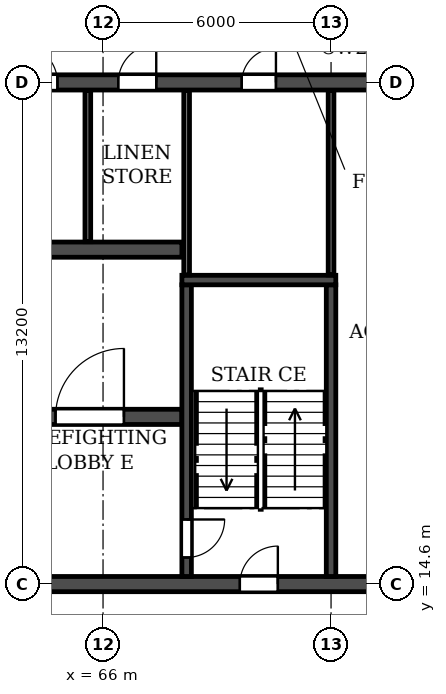
"""IFC4 building model, lengths in metres.
Left out: names, types, materials, properties, quantities, classifications, styles, units other than length and angle.
Written with IfcOpenShell. Run it as: python <this file> out.ifc"""

import sys

from ifc_helpers import new_model, si_unit, direction, frame, frame_2d, origin, place, context, subcontext, project, spatial, rectangle, extrude, element, fill, save


model = new_model("IFC4")
c1 = context("Model", 3, precision=1e-05, world=origin(), true_north=direction((0.0, 1.0)))
c2 = subcontext(c1, "Body", "Model", "MODEL_VIEW")
j1 = project(units=[si_unit("LENGTHUNIT", "METRE"), si_unit("PLANEANGLEUNIT", "RADIAN")], contexts=[c1])
p1 = place(None, origin())
s1 = spatial("IfcSite", under=j1, at=p1, CompositionType="ELEMENT")
p2 = place(p1, origin())
s2 = spatial("IfcBuilding", under=s1, at=p2, CompositionType="ELEMENT")
p3 = place(p2, frame((0.0, 0.0, 175.2)))
s3 = spatial("IfcBuildingStorey", under=s2, at=p3, CompositionType="ELEMENT", Elevation=175.2)
p4 = place(p3, frame((18.2, 14.6, 0.0), z_axis=(0.0, 0.0, 1.0), x_axis=(1.0, 0.0, 0.0)))
e1 = element("IfcWall", 1, at=p4, inside=s3, PredefinedType="SOLIDWALL", context=c2, shape_type="SweptSolid", body=[
    extrude(rectangle(XDim=65.6, YDim=0.4, at=frame_2d((32.8, 0.0))), origin(), (0.0, 0.0, 1.0), 3.08),
])
p5 = place(p4, frame((0.7, 0.0, 0.0)))
e2 = element("IfcOpeningElement", 2, at=p5, cuts=e1, PredefinedType="OPENING", context=c2, shape_type="SweptSolid", body=[
    extrude(rectangle(XDim=1.0, YDim=2.1, at=frame_2d((0.5, 1.05))), frame((0.0, 0.21, 0.0), z_axis=(0.0, -1.0, 0.0), x_axis=(1.0, 0.0, 0.0)), (0.0, 0.0, 1.0), 0.42),
])
p6 = place(p4, frame((8.6, 0.0, 0.0)))
e3 = element("IfcOpeningElement", 3, at=p6, cuts=e1, PredefinedType="OPENING", context=c2, shape_type="SweptSolid", body=[
    extrude(rectangle(XDim=1.0, YDim=2.1, at=frame_2d((0.5, 1.05))), frame((0.0, 0.21, 0.0), z_axis=(0.0, -1.0, 0.0), x_axis=(1.0, 0.0, 0.0)), (0.0, 0.0, 1.0), 0.42),
])
p7 = place(p4, frame((13.2, 0.0, 0.0)))
e4 = element("IfcOpeningElement", 4, at=p7, cuts=e1, PredefinedType="OPENING", context=c2, shape_type="SweptSolid", body=[
    extrude(rectangle(XDim=1.0, YDim=2.1, at=frame_2d((0.5, 1.05))), frame((0.0, 0.21, 0.0), z_axis=(0.0, -1.0, 0.0), x_axis=(1.0, 0.0, 0.0)), (0.0, 0.0, 1.0), 0.42),
])
p8 = place(p4, frame((25.8, 0.0, 0.0)))
e5 = element("IfcOpeningElement", 5, at=p8, cuts=e1, PredefinedType="OPENING", context=c2, shape_type="SweptSolid", body=[
    extrude(rectangle(XDim=1.0, YDim=2.1, at=frame_2d((0.5, 1.05))), frame((0.0, 0.21, 0.0), z_axis=(0.0, -1.0, 0.0), x_axis=(1.0, 0.0, 0.0)), (0.0, 0.0, 1.0), 0.42),
])
p9 = place(p4, frame((29.7, 0.0, 0.0)))
e6 = element("IfcOpeningElement", 6, at=p9, cuts=e1, PredefinedType="OPENING", context=c2, shape_type="SweptSolid", body=[
    extrude(rectangle(XDim=1.0, YDim=2.1, at=frame_2d((0.5, 1.05))), frame((0.0, 0.21, 0.0), z_axis=(0.0, -1.0, 0.0), x_axis=(1.0, 0.0, 0.0)), (0.0, 0.0, 1.0), 0.42),
])
p10 = place(p4, frame((32.3, 0.0, 0.0)))
e7 = element("IfcOpeningElement", 7, at=p10, cuts=e1, PredefinedType="OPENING", context=c2, shape_type="SweptSolid", body=[
    extrude(rectangle(XDim=1.0, YDim=2.1, at=frame_2d((0.5, 1.05))), frame((0.0, 0.21, 0.0), z_axis=(0.0, -1.0, 0.0), x_axis=(1.0, 0.0, 0.0)), (0.0, 0.0, 1.0), 0.42),
])
p11 = place(p4, frame((37.5, 0.0, 0.0)))
e8 = element("IfcOpeningElement", 8, at=p11, cuts=e1, PredefinedType="OPENING", context=c2, shape_type="SweptSolid", body=[
    extrude(rectangle(XDim=1.0, YDim=2.1, at=frame_2d((0.5, 1.05))), frame((0.0, 0.21, 0.0), z_axis=(0.0, -1.0, 0.0), x_axis=(1.0, 0.0, 0.0)), (0.0, 0.0, 1.0), 0.42),
])
p12 = place(p4, frame((51.4, 0.0, 0.0)))
e9 = element("IfcOpeningElement", 9, at=p12, cuts=e1, PredefinedType="OPENING", context=c2, shape_type="SweptSolid", body=[
    extrude(rectangle(XDim=1.0, YDim=2.1, at=frame_2d((0.5, 1.05))), frame((0.0, 0.21, 0.0), z_axis=(0.0, -1.0, 0.0), x_axis=(1.0, 0.0, 0.0)), (0.0, 0.0, 1.0), 0.42),
])
p13 = place(p4, frame((56.0, 0.0, 0.0)))
e10 = element("IfcOpeningElement", 10, at=p13, cuts=e1, PredefinedType="OPENING", context=c2, shape_type="SweptSolid", body=[
    extrude(rectangle(XDim=1.0, YDim=2.1, at=frame_2d((0.5, 1.05))), frame((0.0, 0.21, 0.0), z_axis=(0.0, -1.0, 0.0), x_axis=(1.0, 0.0, 0.0)), (0.0, 0.0, 1.0), 0.42),
])
p14 = place(p4, frame((63.9, 0.0, 0.0)))
e11 = element("IfcOpeningElement", 11, at=p14, cuts=e1, PredefinedType="OPENING", context=c2, shape_type="SweptSolid", body=[
    extrude(rectangle(XDim=1.0, YDim=2.1, at=frame_2d((0.5, 1.05))), frame((0.0, 0.21, 0.0), z_axis=(0.0, -1.0, 0.0), x_axis=(1.0, 0.0, 0.0)), (0.0, 0.0, 1.0), 0.42),
])
p15 = place(p3, frame((18.2, 27.8, 0.0), z_axis=(0.0, 0.0, 1.0), x_axis=(1.0, 0.0, 0.0)))
e12 = element("IfcWall", 12, at=p15, inside=s3, PredefinedType="SOLIDWALL", context=c2, shape_type="SweptSolid", body=[
    extrude(rectangle(XDim=65.6, YDim=0.4, at=frame_2d((32.8, 0.0))), origin(), (0.0, 0.0, 1.0), 3.08),
])
p16 = place(p15, frame((0.7, 0.0, 0.0)))
e13 = element("IfcOpeningElement", 13, at=p16, cuts=e12, PredefinedType="OPENING", context=c2, shape_type="SweptSolid", body=[
    extrude(rectangle(XDim=1.0, YDim=2.1, at=frame_2d((0.5, 1.05))), frame((0.0, 0.21, 0.0), z_axis=(0.0, -1.0, 0.0), x_axis=(1.0, 0.0, 0.0)), (0.0, 0.0, 1.0), 0.42),
])
p17 = place(p15, frame((4.05, 0.0, 0.0)))
e14 = element("IfcOpeningElement", 14, at=p17, cuts=e12, PredefinedType="OPENING", context=c2, shape_type="SweptSolid", body=[
    extrude(rectangle(XDim=0.9, YDim=2.1, at=frame_2d((0.45, 1.05))), frame((0.0, 0.21, 0.0), z_axis=(0.0, -1.0, 0.0), x_axis=(1.0, 0.0, 0.0)), (0.0, 0.0, 1.0), 0.42),
])
p18 = place(p15, frame((13.25, 0.0, 0.0)))
e15 = element("IfcOpeningElement", 15, at=p18, cuts=e12, PredefinedType="OPENING", context=c2, shape_type="SweptSolid", body=[
    extrude(rectangle(XDim=0.9, YDim=2.1, at=frame_2d((0.45, 1.05))), frame((0.0, 0.21, 0.0), z_axis=(0.0, -1.0, 0.0), x_axis=(1.0, 0.0, 0.0)), (0.0, 0.0, 1.0), 0.42),
])
p19 = place(p15, frame((17.7, 0.0, 0.0)))
e16 = element("IfcOpeningElement", 16, at=p19, cuts=e12, PredefinedType="OPENING", context=c2, shape_type="SweptSolid", body=[
    extrude(rectangle(XDim=1.0, YDim=2.1, at=frame_2d((0.5, 1.05))), frame((0.0, 0.21, 0.0), z_axis=(0.0, -1.0, 0.0), x_axis=(1.0, 0.0, 0.0)), (0.0, 0.0, 1.0), 0.42),
])
p20 = place(p15, frame((22.9, 0.0, 0.0)))
e17 = element("IfcOpeningElement", 17, at=p20, cuts=e12, PredefinedType="OPENING", context=c2, shape_type="SweptSolid", body=[
    extrude(rectangle(XDim=1.0, YDim=2.1, at=frame_2d((0.5, 1.05))), frame((0.0, 0.21, 0.0), z_axis=(0.0, -1.0, 0.0), x_axis=(1.0, 0.0, 0.0)), (0.0, 0.0, 1.0), 0.42),
])
p21 = place(p15, frame((29.4, 0.0, 0.0)))
e18 = element("IfcOpeningElement", 18, at=p21, cuts=e12, PredefinedType="OPENING", context=c2, shape_type="SweptSolid", body=[
    extrude(rectangle(XDim=1.0, YDim=2.1, at=frame_2d((0.5, 1.05))), frame((0.0, 0.21, 0.0), z_axis=(0.0, -1.0, 0.0), x_axis=(1.0, 0.0, 0.0)), (0.0, 0.0, 1.0), 0.42),
])
p22 = place(p15, frame((32.3, 0.0, 0.0)))
e19 = element("IfcOpeningElement", 19, at=p22, cuts=e12, PredefinedType="OPENING", context=c2, shape_type="SweptSolid", body=[
    extrude(rectangle(XDim=1.0, YDim=2.1, at=frame_2d((0.5, 1.05))), frame((0.0, 0.21, 0.0), z_axis=(0.0, -1.0, 0.0), x_axis=(1.0, 0.0, 0.0)), (0.0, 0.0, 1.0), 0.42),
])
p23 = place(p15, frame((36.5, 0.0, 0.0)))
e20 = element("IfcOpeningElement", 20, at=p23, cuts=e12, PredefinedType="OPENING", context=c2, shape_type="SweptSolid", body=[
    extrude(rectangle(XDim=1.0, YDim=2.1, at=frame_2d((0.5, 1.05))), frame((0.0, 0.21, 0.0), z_axis=(0.0, -1.0, 0.0), x_axis=(1.0, 0.0, 0.0)), (0.0, 0.0, 1.0), 0.42),
])
p24 = place(p15, frame((41.7, 0.0, 0.0)))
e21 = element("IfcOpeningElement", 21, at=p24, cuts=e12, PredefinedType="OPENING", context=c2, shape_type="SweptSolid", body=[
    extrude(rectangle(XDim=1.0, YDim=2.1, at=frame_2d((0.5, 1.05))), frame((0.0, 0.21, 0.0), z_axis=(0.0, -1.0, 0.0), x_axis=(1.0, 0.0, 0.0)), (0.0, 0.0, 1.0), 0.42),
])
p25 = place(p15, frame((45.6, 0.0, 0.0)))
e22 = element("IfcOpeningElement", 22, at=p25, cuts=e12, PredefinedType="OPENING", context=c2, shape_type="SweptSolid", body=[
    extrude(rectangle(XDim=1.0, YDim=2.1, at=frame_2d((0.5, 1.05))), frame((0.0, 0.21, 0.0), z_axis=(0.0, -1.0, 0.0), x_axis=(1.0, 0.0, 0.0)), (0.0, 0.0, 1.0), 0.42),
])
p26 = place(p15, frame((48.2, 0.0, 0.0)))
e23 = element("IfcOpeningElement", 23, at=p26, cuts=e12, PredefinedType="OPENING", context=c2, shape_type="SweptSolid", body=[
    extrude(rectangle(XDim=1.0, YDim=2.1, at=frame_2d((0.5, 1.05))), frame((0.0, 0.21, 0.0), z_axis=(0.0, -1.0, 0.0), x_axis=(1.0, 0.0, 0.0)), (0.0, 0.0, 1.0), 0.42),
])
p27 = place(p15, frame((51.45, 0.0, 0.0)))
e24 = element("IfcOpeningElement", 24, at=p27, cuts=e12, PredefinedType="OPENING", context=c2, shape_type="SweptSolid", body=[
    extrude(rectangle(XDim=0.9, YDim=2.1, at=frame_2d((0.45, 1.05))), frame((0.0, 0.21, 0.0), z_axis=(0.0, -1.0, 0.0), x_axis=(1.0, 0.0, 0.0)), (0.0, 0.0, 1.0), 0.42),
])
p28 = place(p15, frame((60.65, 0.0, 0.0)))
e25 = element("IfcOpeningElement", 25, at=p28, cuts=e12, PredefinedType="OPENING", context=c2, shape_type="SweptSolid", body=[
    extrude(rectangle(XDim=0.9, YDim=2.1, at=frame_2d((0.45, 1.05))), frame((0.0, 0.21, 0.0), z_axis=(0.0, -1.0, 0.0), x_axis=(1.0, 0.0, 0.0)), (0.0, 0.0, 1.0), 0.42),
])
p29 = place(p15, frame((63.9, 0.0, 0.0)))
e26 = element("IfcOpeningElement", 26, at=p29, cuts=e12, PredefinedType="OPENING", context=c2, shape_type="SweptSolid", body=[
    extrude(rectangle(XDim=1.0, YDim=2.1, at=frame_2d((0.5, 1.05))), frame((0.0, 0.21, 0.0), z_axis=(0.0, -1.0, 0.0), x_axis=(1.0, 0.0, 0.0)), (0.0, 0.0, 1.0), 0.42),
])
p30 = place(p3, frame((33.925, 19.0, 0.0), z_axis=(0.0, 0.0, 1.0), x_axis=(1.0, 0.0, 0.0)))
e27 = element("IfcWall", 27, at=p30, inside=s3, PredefinedType="SOLIDWALL", context=c2, shape_type="SweptSolid", body=[
    extrude(rectangle(XDim=34.15, YDim=0.4, at=frame_2d((17.075, 0.0))), origin(), (0.0, 0.0, 1.0), 3.08),
])
p31 = place(p30, frame((16.175, 0.0, 0.0)))
e28 = element("IfcOpeningElement", 28, at=p31, cuts=e27, PredefinedType="OPENING", context=c2, shape_type="SweptSolid", body=[
    extrude(rectangle(XDim=1.8, YDim=2.1, at=frame_2d((0.9, 1.05))), frame((0.0, 0.21, 0.0), z_axis=(0.0, -1.0, 0.0), x_axis=(1.0, 0.0, 0.0)), (0.0, 0.0, 1.0), 0.42),
])
p32 = place(p30, frame((1.525, 0.0, 0.0)))
e29 = element("IfcOpeningElement", 29, at=p32, cuts=e27, PredefinedType="OPENING", context=c2, shape_type="SweptSolid", body=[
    extrude(rectangle(XDim=1.8, YDim=2.1, at=frame_2d((0.9, 1.05))), frame((0.0, 0.21, 0.0), z_axis=(0.0, -1.0, 0.0), x_axis=(1.0, 0.0, 0.0)), (0.0, 0.0, 1.0), 0.42),
])
p33 = place(p30, frame((30.825, 0.0, 0.0)))
e30 = element("IfcOpeningElement", 30, at=p33, cuts=e27, PredefinedType="OPENING", context=c2, shape_type="SweptSolid", body=[
    extrude(rectangle(XDim=1.8, YDim=2.1, at=frame_2d((0.9, 1.05))), frame((0.0, 0.21, 0.0), z_axis=(0.0, -1.0, 0.0), x_axis=(1.0, 0.0, 0.0)), (0.0, 0.0, 1.0), 0.42),
])
p34 = place(p3, frame((33.925, 23.4, 0.0), z_axis=(0.0, 0.0, 1.0), x_axis=(1.0, 0.0, 0.0)))
e31 = element("IfcWall", 31, at=p34, inside=s3, PredefinedType="SOLIDWALL", context=c2, shape_type="SweptSolid", body=[
    extrude(rectangle(XDim=34.15, YDim=0.4, at=frame_2d((17.075, 0.0))), origin(), (0.0, 0.0, 1.0), 3.08),
])
p35 = place(p34, frame((16.175, 0.0, 0.0)))
e32 = element("IfcOpeningElement", 32, at=p35, cuts=e31, PredefinedType="OPENING", context=c2, shape_type="SweptSolid", body=[
    extrude(rectangle(XDim=1.8, YDim=2.1, at=frame_2d((0.9, 1.05))), frame((0.0, 0.21, 0.0), z_axis=(0.0, -1.0, 0.0), x_axis=(1.0, 0.0, 0.0)), (0.0, 0.0, 1.0), 0.42),
])
p36 = place(p34, frame((0.625, 0.0, 0.0)))
e33 = element("IfcOpeningElement", 33, at=p36, cuts=e31, PredefinedType="OPENING", context=c2, shape_type="SweptSolid", body=[
    extrude(rectangle(XDim=1.1, YDim=2.1, at=frame_2d((0.55, 1.05))), frame((0.0, 0.21, 0.0), z_axis=(0.0, -1.0, 0.0), x_axis=(1.0, 0.0, 0.0)), (0.0, 0.0, 1.0), 0.42),
])
p37 = place(p34, frame((3.225, 0.0, 0.0)))
e34 = element("IfcOpeningElement", 34, at=p37, cuts=e31, PredefinedType="OPENING", context=c2, shape_type="SweptSolid", body=[
    extrude(rectangle(XDim=1.1, YDim=2.1, at=frame_2d((0.55, 1.05))), frame((0.0, 0.21, 0.0), z_axis=(0.0, -1.0, 0.0), x_axis=(1.0, 0.0, 0.0)), (0.0, 0.0, 1.0), 0.42),
])
p38 = place(p34, frame((5.825, 0.0, 0.0)))
e35 = element("IfcOpeningElement", 35, at=p38, cuts=e31, PredefinedType="OPENING", context=c2, shape_type="SweptSolid", body=[
    extrude(rectangle(XDim=1.1, YDim=2.1, at=frame_2d((0.55, 1.05))), frame((0.0, 0.21, 0.0), z_axis=(0.0, -1.0, 0.0), x_axis=(1.0, 0.0, 0.0)), (0.0, 0.0, 1.0), 0.42),
])
p39 = place(p34, frame((8.425, 0.0, 0.0)))
e36 = element("IfcOpeningElement", 36, at=p39, cuts=e31, PredefinedType="OPENING", context=c2, shape_type="SweptSolid", body=[
    extrude(rectangle(XDim=1.1, YDim=2.1, at=frame_2d((0.55, 1.05))), frame((0.0, 0.21, 0.0), z_axis=(0.0, -1.0, 0.0), x_axis=(1.0, 0.0, 0.0)), (0.0, 0.0, 1.0), 0.42),
])
p40 = place(p34, frame((11.025, 0.0, 0.0)))
e37 = element("IfcOpeningElement", 37, at=p40, cuts=e31, PredefinedType="OPENING", context=c2, shape_type="SweptSolid", body=[
    extrude(rectangle(XDim=1.1, YDim=2.1, at=frame_2d((0.55, 1.05))), frame((0.0, 0.21, 0.0), z_axis=(0.0, -1.0, 0.0), x_axis=(1.0, 0.0, 0.0)), (0.0, 0.0, 1.0), 0.42),
])
p41 = place(p34, frame((13.625, 0.0, 0.0)))
e38 = element("IfcOpeningElement", 38, at=p41, cuts=e31, PredefinedType="OPENING", context=c2, shape_type="SweptSolid", body=[
    extrude(rectangle(XDim=1.1, YDim=2.1, at=frame_2d((0.55, 1.05))), frame((0.0, 0.21, 0.0), z_axis=(0.0, -1.0, 0.0), x_axis=(1.0, 0.0, 0.0)), (0.0, 0.0, 1.0), 0.42),
])
p42 = place(p34, frame((27.225, 0.0, 0.0)))
e39 = element("IfcOpeningElement", 39, at=p42, cuts=e31, PredefinedType="OPENING", context=c2, shape_type="SweptSolid", body=[
    extrude(rectangle(XDim=1.1, YDim=2.1, at=frame_2d((0.55, 1.05))), frame((0.0, 0.21, 0.0), z_axis=(0.0, -1.0, 0.0), x_axis=(1.0, 0.0, 0.0)), (0.0, 0.0, 1.0), 0.42),
])
p43 = place(p3, frame((68.2, 14.8, 0.0), z_axis=(0.0, 0.0, 1.0), x_axis=(0.0, 1.0, 0.0)))
e40 = element("IfcWall", 40, at=p43, inside=s3, PredefinedType="SOLIDWALL", context=c2, shape_type="SweptSolid", body=[
    extrude(rectangle(XDim=7.675, YDim=0.25, at=frame_2d((3.837, 0.0))), origin(), (0.0, 0.0, 1.0), 3.08),
])
p44 = place(p43, frame((0.5, 0.0, 0.0)))
e41 = element("IfcOpeningElement", 41, at=p44, cuts=e40, PredefinedType="OPENING", context=c2, shape_type="SweptSolid", body=[
    extrude(rectangle(XDim=1.0, YDim=2.1, at=frame_2d((0.5, 1.05))), frame((0.0, 0.135, 0.0), z_axis=(0.0, -1.0, 0.0), x_axis=(1.0, 0.0, 0.0)), (0.0, 0.0, 1.0), 0.27),
])
p45 = place(p3, frame((72.0, 14.8, 0.0), z_axis=(0.0, 0.0, 1.0), x_axis=(0.0, 1.0, 0.0)))
e42 = element("IfcWall", 42, at=p45, inside=s3, PredefinedType="SOLIDWALL", context=c2, shape_type="SweptSolid", body=[
    extrude(rectangle(XDim=7.675, YDim=0.25, at=frame_2d((3.837, 0.0))), origin(), (0.0, 0.0, 1.0), 3.08),
])
p46 = place(p3, frame((68.075, 22.6, 0.0), z_axis=(0.0, 0.0, 1.0), x_axis=(1.0, 0.0, 0.0)))
e43 = element("IfcWall", 43, at=p46, inside=s3, PredefinedType="SOLIDWALL", context=c2, shape_type="SweptSolid", body=[
    extrude(rectangle(XDim=4.05, YDim=0.25, at=frame_2d((2.025, 0.0))), origin(), (0.0, 0.0, 1.0), 3.08),
])
p47 = place(p3, frame((65.6, 23.61, 0.0), z_axis=(0.0, 0.0, 1.0), x_axis=(0.0, 1.0, 0.0)))
e44 = element("IfcWall", 44, at=p47, inside=s3, PredefinedType="PARTITIONING", context=c2, shape_type="SweptSolid", body=[
    extrude(rectangle(XDim=3.98, YDim=0.15, at=frame_2d((1.99, 0.0))), origin(), (0.0, 0.0, 1.0), 3.08),
])
for number, where, z_axis, x_axis in (
    (45, (68.2, 22.735, 0.0), (0.0, 0.0, 1.0), (0.0, 1.0, 0.0)),
    (46, (72.0, 22.735, 0.0), (0.0, 0.0, 1.0), (0.0, 1.0, 0.0)),
):
    element("IfcWall", number, at=place(p3, frame(where, z_axis=z_axis, x_axis=x_axis)), inside=s3, PredefinedType="PARTITIONING", context=c2, shape_type="SweptSolid", body=[
        extrude(rectangle(XDim=4.855, YDim=0.15, at=frame_2d((2.427, 0.0))), origin(), (0.0, 0.0, 1.0), 3.08),
    ])
p48 = place(p25, origin())
e47 = element("IfcDoor", 47, at=p48, inside=s3, OperationType="SINGLE_SWING_LEFT", PredefinedType="DOOR", context=c2, shape_type="SweptSolid", body=[
    extrude(rectangle(XDim=1.0, YDim=2.1, at=frame_2d((0.5, 1.05))), frame((0.0, 0.025, 0.0), z_axis=(0.0, -1.0, 0.0), x_axis=(1.0, 0.0, 0.0)), (0.0, 0.0, 1.0), 0.05),
])
fill(e22, e47)
p49 = place(p26, origin())
e48 = element("IfcDoor", 48, at=p49, inside=s3, OperationType="SINGLE_SWING_RIGHT", PredefinedType="DOOR", context=c2, shape_type="SweptSolid", body=[
    extrude(rectangle(XDim=1.0, YDim=2.1, at=frame_2d((0.5, 1.05))), frame((0.0, 0.025, 0.0), z_axis=(0.0, -1.0, 0.0), x_axis=(1.0, 0.0, 0.0)), (0.0, 0.0, 1.0), 0.05),
])
fill(e23, e48)
p50 = place(p27, origin())
e49 = element("IfcDoor", 49, at=p50, inside=s3, OperationType="SINGLE_SWING_RIGHT", PredefinedType="DOOR", context=c2, shape_type="SweptSolid", body=[
    extrude(rectangle(XDim=0.9, YDim=2.1, at=frame_2d((0.45, 1.05))), frame((0.0, 0.025, 0.0), z_axis=(0.0, -1.0, 0.0), x_axis=(1.0, 0.0, 0.0)), (0.0, 0.0, 1.0), 0.05),
])
fill(e24, e49)
p51 = place(p12, origin())
e50 = element("IfcDoor", 50, at=p51, inside=s3, OperationType="SINGLE_SWING_RIGHT", PredefinedType="DOOR", context=c2, shape_type="SweptSolid", body=[
    extrude(rectangle(XDim=1.0, YDim=2.1, at=frame_2d((0.5, 1.05))), frame((0.0, 0.025, 0.0), z_axis=(0.0, -1.0, 0.0), x_axis=(1.0, 0.0, 0.0)), (0.0, 0.0, 1.0), 0.05),
])
fill(e9, e50)
p52 = place(p44, frame((1.0, 0.0, 0.0), z_axis=(0.0, 0.0, 1.0), x_axis=(-1.0, 0.0, 0.0)))
e51 = element("IfcDoor", 51, at=p52, inside=s3, OperationType="SINGLE_SWING_LEFT", PredefinedType="DOOR", context=c2, shape_type="SweptSolid", body=[
    extrude(rectangle(XDim=1.0, YDim=2.1, at=frame_2d((0.5, 1.05))), frame((0.0, 0.025, 0.0), z_axis=(0.0, -1.0, 0.0), x_axis=(1.0, 0.0, 0.0)), (0.0, 0.0, 1.0), 0.05),
])
fill(e41, e51)
p53 = place(p33, origin())
e52 = element("IfcDoor", 52, at=p53, inside=s3, OperationType="DOUBLE_DOOR_SINGLE_SWING", PredefinedType="DOOR", context=c2, shape_type="SweptSolid", body=[
    extrude(rectangle(XDim=1.8, YDim=2.1, at=frame_2d((0.9, 1.05))), frame((0.0, 0.025, 0.0), z_axis=(0.0, -1.0, 0.0), x_axis=(1.0, 0.0, 0.0)), (0.0, 0.0, 1.0), 0.05),
])
fill(e30, e52)
save(model, sys.argv[1])
